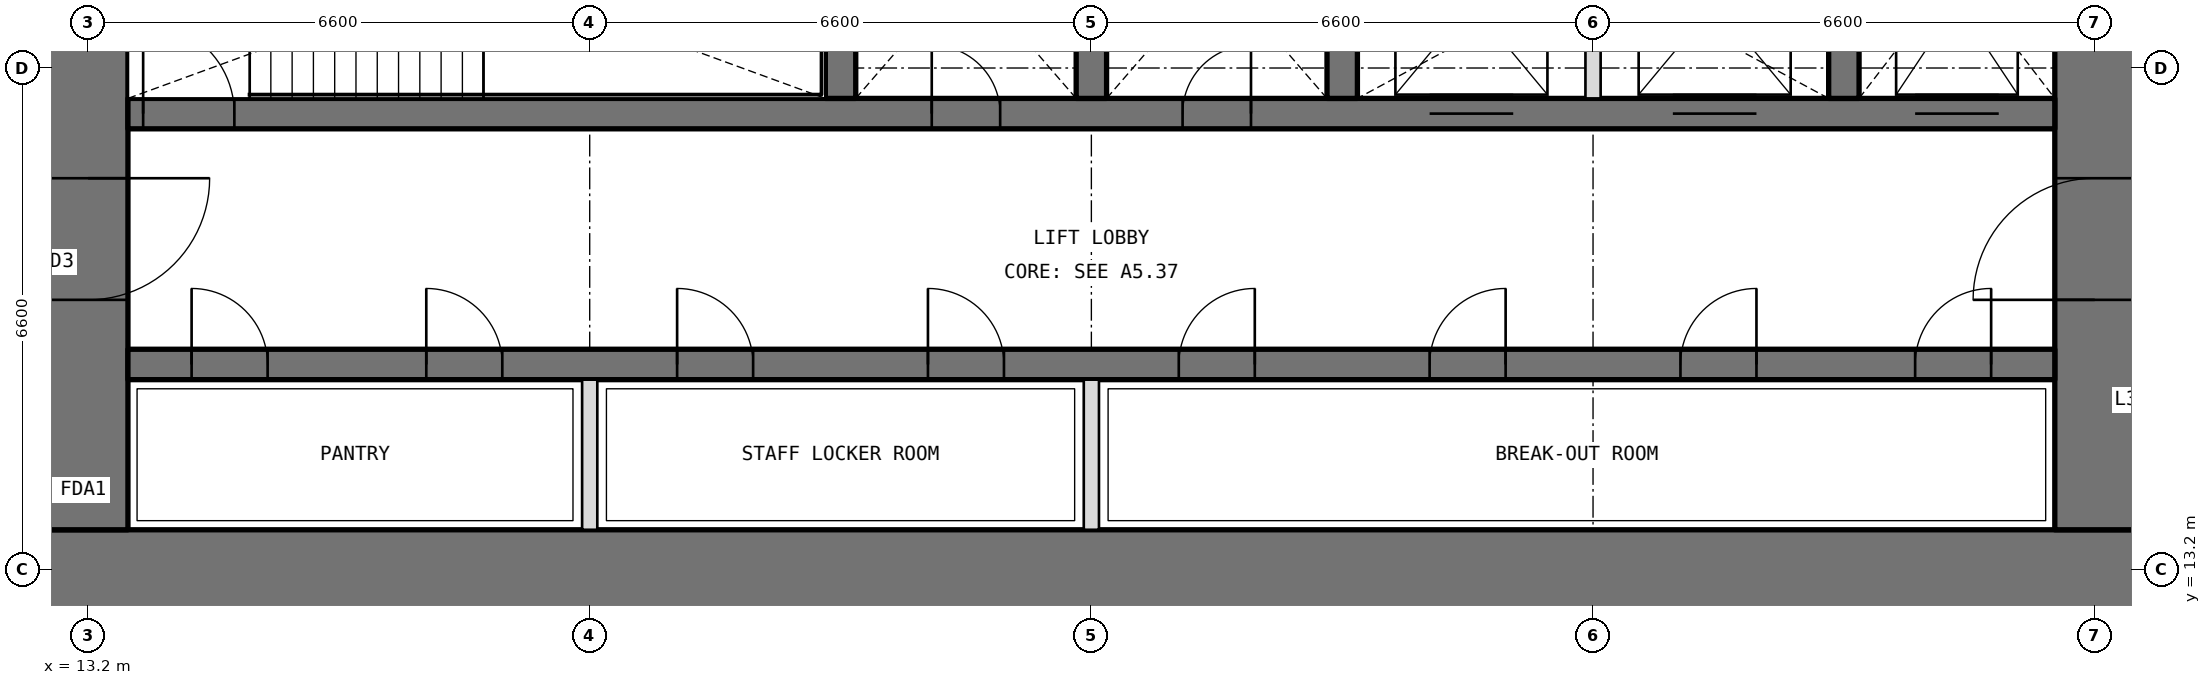
"""IFC4 building model, lengths in metres.
Left out: names, types, materials, properties, quantities, classifications, styles, units other than length and angle.
Written with IfcOpenShell. Run it as: python <this file> out.ifc"""

import sys

from ifc_helpers import new_model, si_unit, direction, frame, frame_2d, origin, place, context, subcontext, project, spatial, rectangle, extrude, element, fill, save


model = new_model("IFC4")
c1 = context("Model", 3, precision=1e-05, world=origin(), true_north=direction((0.0, 1.0)))
c2 = subcontext(c1, "Body", "Model", "MODEL_VIEW")
j1 = project(units=[si_unit("LENGTHUNIT", "METRE"), si_unit("PLANEANGLEUNIT", "RADIAN")], contexts=[c1])
p1 = place(None, origin())
s1 = spatial("IfcSite", under=j1, at=p1, CompositionType="ELEMENT")
p2 = place(p1, origin())
s2 = spatial("IfcBuilding", under=s1, at=p2, CompositionType="ELEMENT")
p3 = place(p2, frame((0.0, 0.0, 155.7)))
s3 = spatial("IfcBuildingStorey", under=s2, at=p3, CompositionType="ELEMENT", Elevation=155.7)
p4 = place(p3, frame((12.675, 13.2, 0.0), z_axis=(0.0, 0.0, 1.0), x_axis=(1.0, 0.0, 0.0)))
e1 = element("IfcWall", 1, at=p4, inside=s3, PredefinedType="SHEAR", context=c2, shape_type="SweptSolid", body=[
    extrude(rectangle(XDim=27.45, YDim=1.05, at=frame_2d((13.725, 0.0))), origin(), (0.0, 0.0, 1.0), 4.2),
])
p5 = place(p3, frame((39.6, 13.725, 0.0), z_axis=(0.0, 0.0, 1.0), x_axis=(0.0, 1.0, 0.0)))
e2 = element("IfcWall", 2, at=p5, inside=s3, PredefinedType="SHEAR", context=c2, shape_type="SweptSolid", body=[
    extrude(rectangle(XDim=18.75, YDim=1.05, at=frame_2d((9.375, 0.0))), origin(), (0.0, 0.0, 1.0), 4.2),
])
p6 = place(p5, frame((3.025, 0.0, 0.0)))
e3 = element("IfcOpeningElement", 3, at=p6, cuts=e2, PredefinedType="OPENING", context=c2, shape_type="SweptSolid", body=[
    extrude(rectangle(XDim=1.6, YDim=2.1, at=frame_2d((0.8, 1.05))), frame((0.0, 0.535, 0.0), z_axis=(0.0, -1.0, 0.0), x_axis=(1.0, 0.0, 0.0)), (0.0, 0.0, 1.0), 1.07),
])
p7 = place(p5, frame((13.825, 0.0, 0.0)))
e4 = element("IfcOpeningElement", 4, at=p7, cuts=e2, PredefinedType="OPENING", context=c2, shape_type="SweptSolid", body=[
    extrude(rectangle(XDim=1.6, YDim=2.1, at=frame_2d((0.8, 1.05))), frame((0.0, 0.535, 0.0), z_axis=(0.0, -1.0, 0.0), x_axis=(1.0, 0.0, 0.0)), (0.0, 0.0, 1.0), 1.07),
])
p8 = place(p3, frame((13.2, 32.475, 0.0), z_axis=(0.0, 0.0, 1.0), x_axis=(0.0, -1.0, 0.0)))
e5 = element("IfcWall", 5, at=p8, inside=s3, PredefinedType="SHEAR", context=c2, shape_type="SweptSolid", body=[
    extrude(rectangle(XDim=18.75, YDim=1.05, at=frame_2d((9.375, 0.0))), origin(), (0.0, 0.0, 1.0), 4.2),
])
p9 = place(p8, frame((14.125, 0.0, 0.0)))
e6 = element("IfcOpeningElement", 6, at=p9, cuts=e5, PredefinedType="OPENING", context=c2, shape_type="SweptSolid", body=[
    extrude(rectangle(XDim=1.6, YDim=2.1, at=frame_2d((0.8, 1.05))), frame((0.0, 0.535, 0.0), z_axis=(0.0, -1.0, 0.0), x_axis=(1.0, 0.0, 0.0)), (0.0, 0.0, 1.0), 1.07),
])
p10 = place(p8, frame((3.325, 0.0, 0.0)))
e7 = element("IfcOpeningElement", 7, at=p10, cuts=e5, PredefinedType="OPENING", context=c2, shape_type="SweptSolid", body=[
    extrude(rectangle(XDim=1.6, YDim=2.1, at=frame_2d((0.8, 1.05))), frame((0.0, 0.535, 0.0), z_axis=(0.0, -1.0, 0.0), x_axis=(1.0, 0.0, 0.0)), (0.0, 0.0, 1.0), 1.07),
])
p11 = place(p3, frame((13.725, 15.9, 0.0), z_axis=(0.0, 0.0, 1.0), x_axis=(1.0, 0.0, 0.0)))
e8 = element("IfcWall", 8, at=p11, inside=s3, PredefinedType="SHEAR", context=c2, shape_type="SweptSolid", body=[
    extrude(rectangle(XDim=25.35, YDim=0.4, at=frame_2d((12.675, 0.0))), origin(), (0.0, 0.0, 1.0), 4.2),
])
p12 = place(p11, frame((0.837, 0.0, 0.0)))
e9 = element("IfcOpeningElement", 9, at=p12, cuts=e8, PredefinedType="OPENING", context=c2, shape_type="SweptSolid", body=[
    extrude(rectangle(XDim=1.0, YDim=2.1, at=frame_2d((0.5, 1.05))), frame((0.0, 0.21, 0.0), z_axis=(0.0, -1.0, 0.0), x_axis=(1.0, 0.0, 0.0)), (0.0, 0.0, 1.0), 0.42),
])
p13 = place(p11, frame((3.925, 0.0, 0.0)))
e10 = element("IfcOpeningElement", 10, at=p13, cuts=e8, PredefinedType="OPENING", context=c2, shape_type="SweptSolid", body=[
    extrude(rectangle(XDim=1.0, YDim=2.1, at=frame_2d((0.5, 1.05))), frame((0.0, 0.21, 0.0), z_axis=(0.0, -1.0, 0.0), x_axis=(1.0, 0.0, 0.0)), (0.0, 0.0, 1.0), 0.42),
])
p14 = place(p11, frame((7.225, 0.0, 0.0)))
e11 = element("IfcOpeningElement", 11, at=p14, cuts=e8, PredefinedType="OPENING", context=c2, shape_type="SweptSolid", body=[
    extrude(rectangle(XDim=1.0, YDim=2.1, at=frame_2d((0.5, 1.05))), frame((0.0, 0.21, 0.0), z_axis=(0.0, -1.0, 0.0), x_axis=(1.0, 0.0, 0.0)), (0.0, 0.0, 1.0), 0.42),
])
p15 = place(p11, frame((10.525, 0.0, 0.0)))
e12 = element("IfcOpeningElement", 12, at=p15, cuts=e8, PredefinedType="OPENING", context=c2, shape_type="SweptSolid", body=[
    extrude(rectangle(XDim=1.0, YDim=2.1, at=frame_2d((0.5, 1.05))), frame((0.0, 0.21, 0.0), z_axis=(0.0, -1.0, 0.0), x_axis=(1.0, 0.0, 0.0)), (0.0, 0.0, 1.0), 0.42),
])
p16 = place(p11, frame((13.825, 0.0, 0.0)))
e13 = element("IfcOpeningElement", 13, at=p16, cuts=e8, PredefinedType="OPENING", context=c2, shape_type="SweptSolid", body=[
    extrude(rectangle(XDim=1.0, YDim=2.1, at=frame_2d((0.5, 1.05))), frame((0.0, 0.21, 0.0), z_axis=(0.0, -1.0, 0.0), x_axis=(1.0, 0.0, 0.0)), (0.0, 0.0, 1.0), 0.42),
])
p17 = place(p11, frame((17.125, 0.0, 0.0)))
e14 = element("IfcOpeningElement", 14, at=p17, cuts=e8, PredefinedType="OPENING", context=c2, shape_type="SweptSolid", body=[
    extrude(rectangle(XDim=1.0, YDim=2.1, at=frame_2d((0.5, 1.05))), frame((0.0, 0.21, 0.0), z_axis=(0.0, -1.0, 0.0), x_axis=(1.0, 0.0, 0.0)), (0.0, 0.0, 1.0), 0.42),
])
p18 = place(p11, frame((20.425, 0.0, 0.0)))
e15 = element("IfcOpeningElement", 15, at=p18, cuts=e8, PredefinedType="OPENING", context=c2, shape_type="SweptSolid", body=[
    extrude(rectangle(XDim=1.0, YDim=2.1, at=frame_2d((0.5, 1.05))), frame((0.0, 0.21, 0.0), z_axis=(0.0, -1.0, 0.0), x_axis=(1.0, 0.0, 0.0)), (0.0, 0.0, 1.0), 0.42),
])
p19 = place(p11, frame((23.512, 0.0, 0.0)))
e16 = element("IfcOpeningElement", 16, at=p19, cuts=e8, PredefinedType="OPENING", context=c2, shape_type="SweptSolid", body=[
    extrude(rectangle(XDim=1.0, YDim=2.1, at=frame_2d((0.5, 1.05))), frame((0.0, 0.21, 0.0), z_axis=(0.0, -1.0, 0.0), x_axis=(1.0, 0.0, 0.0)), (0.0, 0.0, 1.0), 0.42),
])
p20 = place(p3, frame((13.725, 19.2, 0.0), z_axis=(0.0, 0.0, 1.0), x_axis=(1.0, 0.0, 0.0)))
e17 = element("IfcWall", 17, at=p20, inside=s3, PredefinedType="SHEAR", context=c2, shape_type="SweptSolid", body=[
    extrude(rectangle(XDim=25.35, YDim=0.4, at=frame_2d((12.675, 0.0))), origin(), (0.0, 0.0, 1.0), 4.2),
])
p21 = place(p20, frame((10.575, 0.0, 0.0)))
e18 = element("IfcOpeningElement", 18, at=p21, cuts=e17, PredefinedType="OPENING", context=c2, shape_type="SweptSolid", body=[
    extrude(rectangle(XDim=0.9, YDim=2.1, at=frame_2d((0.45, 1.05))), frame((0.0, 0.21, 0.0), z_axis=(0.0, -1.0, 0.0), x_axis=(1.0, 0.0, 0.0)), (0.0, 0.0, 1.0), 0.42),
])
p22 = place(p20, frame((13.875, 0.0, 0.0)))
e19 = element("IfcOpeningElement", 19, at=p22, cuts=e17, PredefinedType="OPENING", context=c2, shape_type="SweptSolid", body=[
    extrude(rectangle(XDim=0.9, YDim=2.1, at=frame_2d((0.45, 1.05))), frame((0.0, 0.21, 0.0), z_axis=(0.0, -1.0, 0.0), x_axis=(1.0, 0.0, 0.0)), (0.0, 0.0, 1.0), 0.42),
])
p23 = place(p20, frame((0.2, 0.0, 0.0)))
e20 = element("IfcOpeningElement", 20, at=p23, cuts=e17, PredefinedType="OPENING", context=c2, shape_type="SweptSolid", body=[
    extrude(rectangle(XDim=1.2, YDim=2.1, at=frame_2d((0.6, 1.05))), frame((0.0, 0.21, 0.0), z_axis=(0.0, -1.0, 0.0), x_axis=(1.0, 0.0, 0.0)), (0.0, 0.0, 1.0), 0.42),
])
p24 = place(p20, frame((23.512, 0.0, 0.0)))
e21 = element("IfcOpeningElement", 21, at=p24, cuts=e17, PredefinedType="OPENING", context=c2, shape_type="SweptSolid", body=[
    extrude(rectangle(XDim=1.1, YDim=2.1, at=frame_2d((0.55, 1.05))), frame((0.0, 0.21, 0.0), z_axis=(0.0, -1.0, 0.0), x_axis=(1.0, 0.0, 0.0)), (0.0, 0.0, 1.0), 0.42),
])
p25 = place(p20, frame((17.125, 0.0, 0.0)))
e22 = element("IfcOpeningElement", 22, at=p25, cuts=e17, PredefinedType="OPENING", context=c2, shape_type="SweptSolid", body=[
    extrude(rectangle(XDim=1.1, YDim=2.1, at=frame_2d((0.55, 1.05))), frame((0.0, 0.21, 0.0), z_axis=(0.0, -1.0, 0.0), x_axis=(1.0, 0.0, 0.0)), (0.0, 0.0, 1.0), 0.42),
])
p26 = place(p20, frame((20.325, 0.0, 0.0)))
e23 = element("IfcOpeningElement", 23, at=p26, cuts=e17, PredefinedType="OPENING", context=c2, shape_type="SweptSolid", body=[
    extrude(rectangle(XDim=1.1, YDim=2.1, at=frame_2d((0.55, 1.05))), frame((0.0, 0.21, 0.0), z_axis=(0.0, -1.0, 0.0), x_axis=(1.0, 0.0, 0.0)), (0.0, 0.0, 1.0), 0.42),
])
for number, where, z_axis, x_axis in (
    (24, (23.1, 19.4, 0.0), (0.0, 0.0, 1.0), (0.0, 1.0, 0.0)),
    (25, (26.4, 19.4, 0.0), (0.0, 0.0, 1.0), (0.0, 1.0, 0.0)),
    (26, (29.7, 19.4, 0.0), (0.0, 0.0, 1.0), (0.0, 1.0, 0.0)),
    (27, (36.3, 19.4, 0.0), (0.0, 0.0, 1.0), (0.0, 1.0, 0.0)),
):
    element("IfcWall", number, at=place(p3, frame(where, z_axis=z_axis, x_axis=x_axis)), inside=s3, PredefinedType="SHEAR", context=c2, shape_type="SweptSolid", body=[
        extrude(rectangle(XDim=3.35, YDim=0.4, at=frame_2d((1.675, 0.0))), origin(), (0.0, 0.0, 1.0), 4.2),
    ])
for number, where, z_axis, x_axis in (
    (28, (19.8, 13.725, 0.0), (0.0, 0.0, 1.0), (0.0, 1.0, 0.0)),
    (29, (26.4, 13.725, 0.0), (0.0, 0.0, 1.0), (0.0, 1.0, 0.0)),
):
    element("IfcWall", number, at=place(p3, frame(where, z_axis=z_axis, x_axis=x_axis)), inside=s3, PredefinedType="PARTITIONING", context=c2, shape_type="SweptSolid", body=[
        extrude(rectangle(XDim=1.975, YDim=0.2, at=frame_2d((0.987, 0.0))), origin(), (0.0, 0.0, 1.0), 4.2),
    ])
p27 = place(p3, frame((33.0, 19.4, 0.0), z_axis=(0.0, 0.0, 1.0), x_axis=(0.0, 1.0, 0.0)))
e30 = element("IfcWall", 30, at=p27, inside=s3, PredefinedType="PARTITIONING", context=c2, shape_type="SweptSolid", body=[
    extrude(rectangle(XDim=3.35, YDim=0.2, at=frame_2d((1.675, 0.0))), origin(), (0.0, 0.0, 1.0), 4.2),
])
p28 = place(p21, origin())
e31 = element("IfcDoor", 31, at=p28, inside=s3, OperationType="SINGLE_SWING_LEFT", PredefinedType="DOOR", context=c2, shape_type="SweptSolid", body=[
    extrude(rectangle(XDim=0.9, YDim=2.1, at=frame_2d((0.45, 1.05))), frame((0.0, 0.025, 0.0), z_axis=(0.0, -1.0, 0.0), x_axis=(1.0, 0.0, 0.0)), (0.0, 0.0, 1.0), 0.05),
])
fill(e18, e31)
p29 = place(p22, origin())
e32 = element("IfcDoor", 32, at=p29, inside=s3, OperationType="SINGLE_SWING_RIGHT", PredefinedType="DOOR", context=c2, shape_type="SweptSolid", body=[
    extrude(rectangle(XDim=0.9, YDim=2.1, at=frame_2d((0.45, 1.05))), frame((0.0, 0.025, 0.0), z_axis=(0.0, -1.0, 0.0), x_axis=(1.0, 0.0, 0.0)), (0.0, 0.0, 1.0), 0.05),
])
fill(e19, e32)
p30 = place(p12, origin())
e33 = element("IfcDoor", 33, at=p30, inside=s3, OperationType="SINGLE_SWING_LEFT", PredefinedType="DOOR", context=c2, shape_type="SweptSolid", body=[
    extrude(rectangle(XDim=1.0, YDim=2.1, at=frame_2d((0.5, 1.05))), frame((0.0, 0.025, 0.0), z_axis=(0.0, -1.0, 0.0), x_axis=(1.0, 0.0, 0.0)), (0.0, 0.0, 1.0), 0.05),
])
fill(e9, e33)
p31 = place(p13, origin())
e34 = element("IfcDoor", 34, at=p31, inside=s3, OperationType="SINGLE_SWING_LEFT", PredefinedType="DOOR", context=c2, shape_type="SweptSolid", body=[
    extrude(rectangle(XDim=1.0, YDim=2.1, at=frame_2d((0.5, 1.05))), frame((0.0, 0.025, 0.0), z_axis=(0.0, -1.0, 0.0), x_axis=(1.0, 0.0, 0.0)), (0.0, 0.0, 1.0), 0.05),
])
fill(e10, e34)
p32 = place(p14, origin())
e35 = element("IfcDoor", 35, at=p32, inside=s3, OperationType="SINGLE_SWING_LEFT", PredefinedType="DOOR", context=c2, shape_type="SweptSolid", body=[
    extrude(rectangle(XDim=1.0, YDim=2.1, at=frame_2d((0.5, 1.05))), frame((0.0, 0.025, 0.0), z_axis=(0.0, -1.0, 0.0), x_axis=(1.0, 0.0, 0.0)), (0.0, 0.0, 1.0), 0.05),
])
fill(e11, e35)
p33 = place(p15, origin())
e36 = element("IfcDoor", 36, at=p33, inside=s3, OperationType="SINGLE_SWING_LEFT", PredefinedType="DOOR", context=c2, shape_type="SweptSolid", body=[
    extrude(rectangle(XDim=1.0, YDim=2.1, at=frame_2d((0.5, 1.05))), frame((0.0, 0.025, 0.0), z_axis=(0.0, -1.0, 0.0), x_axis=(1.0, 0.0, 0.0)), (0.0, 0.0, 1.0), 0.05),
])
fill(e12, e36)
p34 = place(p16, origin())
e37 = element("IfcDoor", 37, at=p34, inside=s3, OperationType="SINGLE_SWING_RIGHT", PredefinedType="DOOR", context=c2, shape_type="SweptSolid", body=[
    extrude(rectangle(XDim=1.0, YDim=2.1, at=frame_2d((0.5, 1.05))), frame((0.0, 0.025, 0.0), z_axis=(0.0, -1.0, 0.0), x_axis=(1.0, 0.0, 0.0)), (0.0, 0.0, 1.0), 0.05),
])
fill(e13, e37)
p35 = place(p17, origin())
e38 = element("IfcDoor", 38, at=p35, inside=s3, OperationType="SINGLE_SWING_RIGHT", PredefinedType="DOOR", context=c2, shape_type="SweptSolid", body=[
    extrude(rectangle(XDim=1.0, YDim=2.1, at=frame_2d((0.5, 1.05))), frame((0.0, 0.025, 0.0), z_axis=(0.0, -1.0, 0.0), x_axis=(1.0, 0.0, 0.0)), (0.0, 0.0, 1.0), 0.05),
])
fill(e14, e38)
p36 = place(p18, origin())
e39 = element("IfcDoor", 39, at=p36, inside=s3, OperationType="SINGLE_SWING_RIGHT", PredefinedType="DOOR", context=c2, shape_type="SweptSolid", body=[
    extrude(rectangle(XDim=1.0, YDim=2.1, at=frame_2d((0.5, 1.05))), frame((0.0, 0.025, 0.0), z_axis=(0.0, -1.0, 0.0), x_axis=(1.0, 0.0, 0.0)), (0.0, 0.0, 1.0), 0.05),
])
fill(e15, e39)
p37 = place(p19, origin())
e40 = element("IfcDoor", 40, at=p37, inside=s3, OperationType="SINGLE_SWING_RIGHT", PredefinedType="DOOR", context=c2, shape_type="SweptSolid", body=[
    extrude(rectangle(XDim=1.0, YDim=2.1, at=frame_2d((0.5, 1.05))), frame((0.0, 0.025, 0.0), z_axis=(0.0, -1.0, 0.0), x_axis=(1.0, 0.0, 0.0)), (0.0, 0.0, 1.0), 0.05),
])
fill(e16, e40)
p38 = place(p23, origin())
e41 = element("IfcDoor", 41, at=p38, inside=s3, OperationType="SINGLE_SWING_LEFT", PredefinedType="DOOR", context=c2, shape_type="SweptSolid", body=[
    extrude(rectangle(XDim=1.2, YDim=2.1, at=frame_2d((0.6, 1.05))), frame((0.0, 0.025, 0.0), z_axis=(0.0, -1.0, 0.0), x_axis=(1.0, 0.0, 0.0)), (0.0, 0.0, 1.0), 0.05),
])
fill(e20, e41)
p39 = place(p9, origin())
e42 = element("IfcDoor", 42, at=p39, inside=s3, OperationType="DOUBLE_DOOR_DOUBLE_SWING", PredefinedType="DOOR", context=c2, shape_type="SweptSolid", body=[
    extrude(rectangle(XDim=1.6, YDim=2.1, at=frame_2d((0.8, 1.05))), frame((0.0, 0.025, 0.0), z_axis=(0.0, -1.0, 0.0), x_axis=(1.0, 0.0, 0.0)), (0.0, 0.0, 1.0), 0.05),
])
fill(e6, e42)
p40 = place(p6, origin())
e43 = element("IfcDoor", 43, at=p40, inside=s3, OperationType="DOUBLE_DOOR_DOUBLE_SWING", PredefinedType="DOOR", context=c2, shape_type="SweptSolid", body=[
    extrude(rectangle(XDim=1.6, YDim=2.1, at=frame_2d((0.8, 1.05))), frame((0.0, 0.025, 0.0), z_axis=(0.0, -1.0, 0.0), x_axis=(1.0, 0.0, 0.0)), (0.0, 0.0, 1.0), 0.05),
])
fill(e3, e43)
p41 = place(p24, origin())
e44 = element("IfcDoor", 44, at=p41, inside=s3, OperationType="DOUBLE_DOOR_SLIDING", PredefinedType="DOOR", context=c2, shape_type="SweptSolid", body=[
    extrude(rectangle(XDim=1.1, YDim=2.1, at=frame_2d((0.55, 1.05))), frame((0.0, 0.025, 0.0), z_axis=(0.0, -1.0, 0.0), x_axis=(1.0, 0.0, 0.0)), (0.0, 0.0, 1.0), 0.05),
])
fill(e21, e44)
p42 = place(p25, origin())
e45 = element("IfcDoor", 45, at=p42, inside=s3, OperationType="DOUBLE_DOOR_SLIDING", PredefinedType="DOOR", context=c2, shape_type="SweptSolid", body=[
    extrude(rectangle(XDim=1.1, YDim=2.1, at=frame_2d((0.55, 1.05))), frame((0.0, 0.025, 0.0), z_axis=(0.0, -1.0, 0.0), x_axis=(1.0, 0.0, 0.0)), (0.0, 0.0, 1.0), 0.05),
])
fill(e22, e45)
p43 = place(p26, origin())
e46 = element("IfcDoor", 46, at=p43, inside=s3, OperationType="DOUBLE_DOOR_SLIDING", PredefinedType="DOOR", context=c2, shape_type="SweptSolid", body=[
    extrude(rectangle(XDim=1.1, YDim=2.1, at=frame_2d((0.55, 1.05))), frame((0.0, 0.025, 0.0), z_axis=(0.0, -1.0, 0.0), x_axis=(1.0, 0.0, 0.0)), (0.0, 0.0, 1.0), 0.05),
])
fill(e23, e46)
save(model, sys.argv[1])
